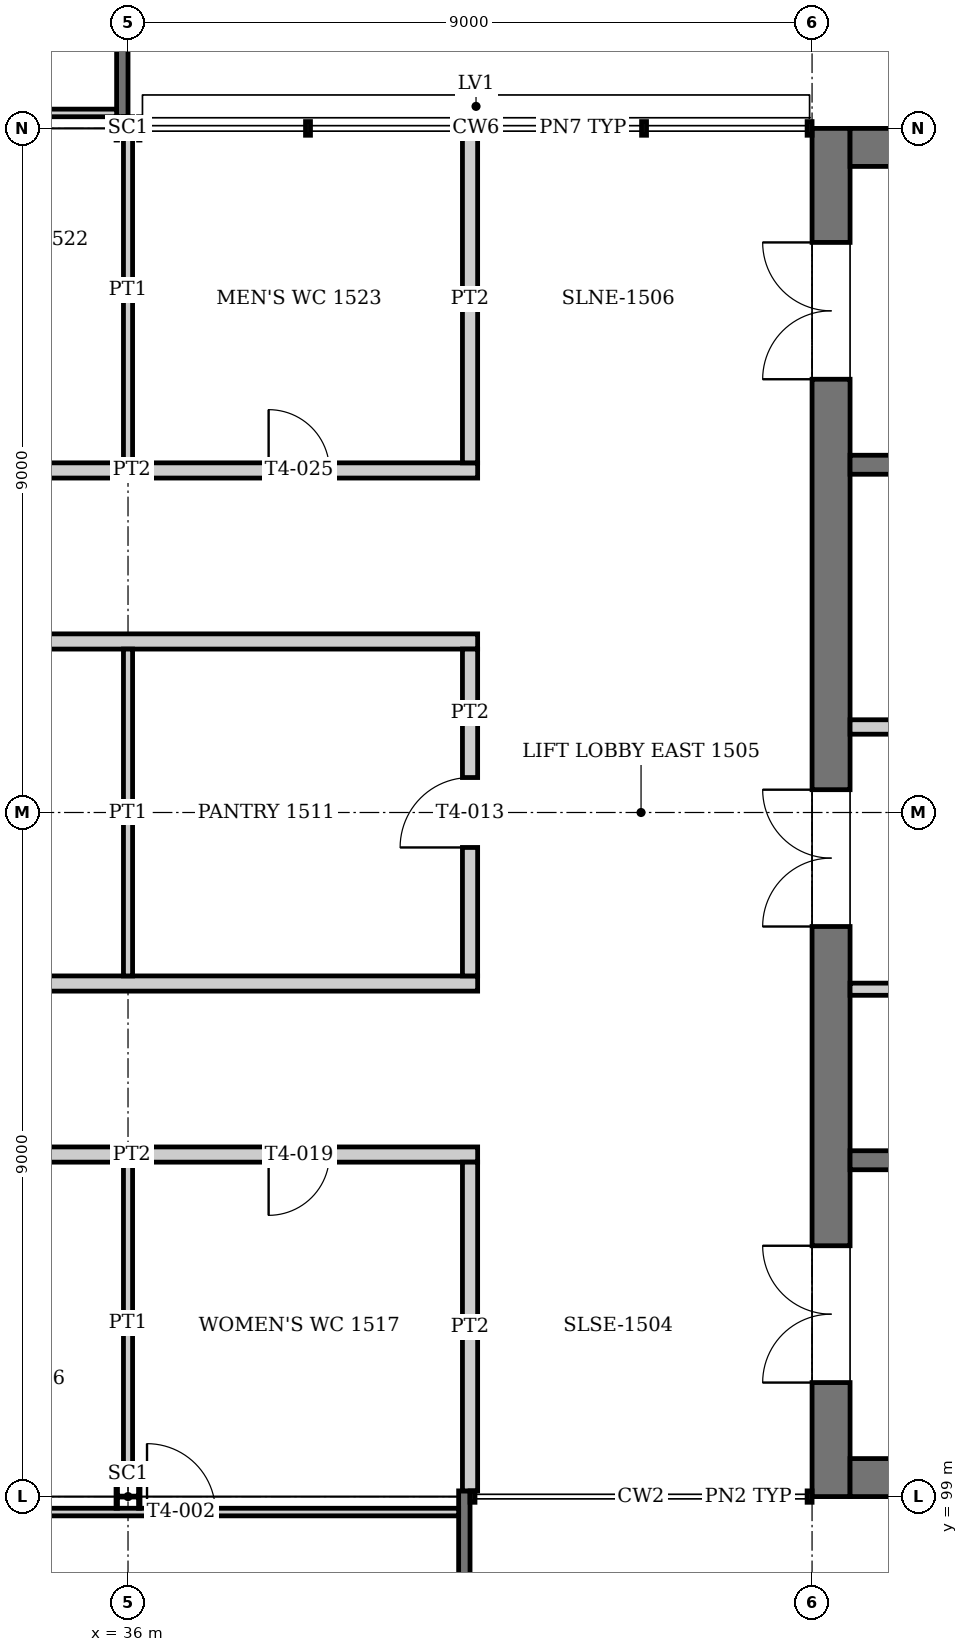
"""IFC4 building model, lengths in metres.
Left out: names, types, materials, properties, quantities, classifications, styles, units other than length and angle.
Written with IfcOpenShell. Run it as: python <this file> out.ifc"""

import sys

from ifc_helpers import new_model, si_unit, direction, frame, frame_2d, origin, origin_2d, place, context, subcontext, project, spatial, rectangle, i_section, extrude, element, fill, save


model = new_model("IFC4")
c1 = context("Model", 3, precision=1e-05, world=origin(), true_north=direction((0.0, 1.0)))
c2 = subcontext(c1, "Body", "Model", "MODEL_VIEW")
j1 = project(units=[si_unit("LENGTHUNIT", "METRE"), si_unit("PLANEANGLEUNIT", "RADIAN")], contexts=[c1])
p1 = place(None, origin())
s1 = spatial("IfcSite", under=j1, at=p1, CompositionType="ELEMENT")
p2 = place(p1, origin())
s2 = spatial("IfcBuilding", under=s1, at=p2, CompositionType="ELEMENT")
p3 = place(p2, frame((0.0, 0.0, 63.2)))
s3 = spatial("IfcBuildingStorey", under=s2, at=p3, CompositionType="ELEMENT", Elevation=63.2)
for number, where, z_axis, x_axis in (
    (1, (36.0, 99.0, 0.0), (0.0, 0.0, 1.0), (0.0, 1.0, 0.0)),
    (2, (36.0, 117.0, 0.0), (0.0, 0.0, 1.0), (0.0, 1.0, 0.0)),
):
    element("IfcColumn", number, at=place(p3, frame(where, z_axis=z_axis, x_axis=x_axis)), inside=s3, PredefinedType="COLUMN", context=c2, shape_type="SweptSolid", body=[
        extrude(i_section(OverallWidth=0.307, OverallDepth=0.315, WebThickness=0.012, FlangeThickness=0.019, at=origin_2d()), origin(), (0.0, 0.0, 1.0), 4.0),
    ])
p4 = place(p3, frame((45.25, 99.0, 0.0), z_axis=(0.0, 0.0, 1.0), x_axis=(0.0, 1.0, 0.0)))
e3 = element("IfcWall", 3, at=p4, inside=s3, PredefinedType="SHEAR", context=c2, shape_type="SweptSolid", body=[
    extrude(rectangle(XDim=18.0, YDim=0.5, at=frame_2d((9.0, 0.0))), origin(), (0.0, 0.0, 1.0), 4.0),
])
p5 = place(p4, frame((1.5, 0.0, 0.0)))
e4 = element("IfcOpeningElement", 4, at=p5, cuts=e3, PredefinedType="OPENING", context=c2, shape_type="SweptSolid", body=[
    extrude(rectangle(XDim=1.8, YDim=2.1, at=frame_2d((0.9, 1.05))), frame((0.0, 0.26, 0.0), z_axis=(0.0, -1.0, 0.0), x_axis=(1.0, 0.0, 0.0)), (0.0, 0.0, 1.0), 0.52),
])
p6 = place(p4, frame((14.7, 0.0, 0.0)))
e5 = element("IfcOpeningElement", 5, at=p6, cuts=e3, PredefinedType="OPENING", context=c2, shape_type="SweptSolid", body=[
    extrude(rectangle(XDim=1.8, YDim=2.1, at=frame_2d((0.9, 1.05))), frame((0.0, 0.26, 0.0), z_axis=(0.0, -1.0, 0.0), x_axis=(1.0, 0.0, 0.0)), (0.0, 0.0, 1.0), 0.52),
])
p7 = place(p4, frame((7.5, 0.0, 0.0)))
e6 = element("IfcOpeningElement", 6, at=p7, cuts=e3, PredefinedType="OPENING", context=c2, shape_type="SweptSolid", body=[
    extrude(rectangle(XDim=1.8, YDim=2.1, at=frame_2d((0.9, 1.05))), frame((0.0, 0.26, 0.0), z_axis=(0.0, -1.0, 0.0), x_axis=(1.0, 0.0, 0.0)), (0.0, 0.0, 1.0), 0.52),
])
for number, where, z_axis, x_axis in (
    (7, (45.5, 99.25, 0.0), (0.0, 0.0, 1.0), (1.0, 0.0, 0.0)),
    (8, (45.5, 116.75, 0.0), (0.0, 0.0, 1.0), (1.0, 0.0, 0.0)),
):
    element("IfcWall", number, at=place(p3, frame(where, z_axis=z_axis, x_axis=x_axis)), inside=s3, PredefinedType="SHEAR", context=c2, shape_type="SweptSolid", body=[
        extrude(rectangle(XDim=8.0, YDim=0.5, at=frame_2d((4.0, 0.0))), origin(), (0.0, 0.0, 1.0), 4.0),
    ])
p8 = place(p3, frame((40.425, 95.55, -0.15), z_axis=(0.0, 0.0, 1.0), x_axis=(0.0, 1.0, 0.0)))
e9 = element("IfcWall", 9, at=p8, inside=s3, PredefinedType="SOLIDWALL", context=c2, shape_type="SweptSolid", body=[
    extrude(rectangle(XDim=3.525, YDim=0.15, at=frame_2d((1.762, 0.0))), origin(), (0.0, 0.0, 1.0), 2.75),
])
p9 = place(p3, frame((31.65, 98.796, 0.0), z_axis=(0.0, 0.0, 1.0), x_axis=(1.0, 0.0, 0.0)))
e10 = element("IfcWall", 10, at=p9, inside=s3, PredefinedType="PARTITIONING", context=c2, shape_type="SweptSolid", body=[
    extrude(rectangle(XDim=8.7, YDim=0.1, at=frame_2d((4.35, 0.0))), origin(), (0.0, 0.0, 1.0), 2.6),
])
p10 = place(p9, frame((4.6, 0.0, 0.0)))
e11 = element("IfcOpeningElement", 11, at=p10, cuts=e10, PredefinedType="OPENING", context=c2, shape_type="SweptSolid", body=[
    extrude(rectangle(XDim=0.9, YDim=2.1, at=frame_2d((0.45, 1.05))), frame((0.0, 0.06, 0.0), z_axis=(0.0, -1.0, 0.0), x_axis=(1.0, 0.0, 0.0)), (0.0, 0.0, 1.0), 0.12),
])
p11 = place(p3, frame((35.925, 120.45, -0.15), z_axis=(0.0, 0.0, 1.0), x_axis=(0.0, -1.0, 0.0)))
e12 = element("IfcWall", 12, at=p11, inside=s3, PredefinedType="SOLIDWALL", context=c2, shape_type="SweptSolid", body=[
    extrude(rectangle(XDim=3.296, YDim=0.15, at=frame_2d((1.648, 0.0))), origin(), (0.0, 0.0, 1.0), 2.75),
])
p12 = place(p3, frame((18.15, 117.204, 0.0), z_axis=(0.0, 0.0, 1.0), x_axis=(1.0, 0.0, 0.0)))
e13 = element("IfcWall", 13, at=p12, inside=s3, PredefinedType="PARTITIONING", context=c2, shape_type="SweptSolid", body=[
    extrude(rectangle(XDim=17.7, YDim=0.1, at=frame_2d((8.85, 0.0))), origin(), (0.0, 0.0, 1.0), 2.6),
])
p13 = place(p12, frame((9.1, 0.0, 0.0)))
e14 = element("IfcOpeningElement", 14, at=p13, cuts=e13, PredefinedType="OPENING", context=c2, shape_type="SweptSolid", body=[
    extrude(rectangle(XDim=0.9, YDim=2.1, at=frame_2d((0.45, 1.05))), frame((0.0, 0.06, 0.0), z_axis=(0.0, -1.0, 0.0), x_axis=(1.0, 0.0, 0.0)), (0.0, 0.0, 1.0), 0.12),
])
for number, where, z_axis, x_axis in (
    (15, (45.5, 103.425, 0.0), (0.0, 0.0, 1.0), (1.0, 0.0, 0.0)),
    (16, (45.5, 112.575, 0.0), (0.0, 0.0, 1.0), (1.0, 0.0, 0.0)),
):
    element("IfcWall", number, at=place(p3, frame(where, z_axis=z_axis, x_axis=x_axis)), inside=s3, PredefinedType="SOLIDWALL", context=c2, shape_type="SweptSolid", body=[
        extrude(rectangle(XDim=8.0, YDim=0.25, at=frame_2d((4.0, 0.0))), origin(), (0.0, 0.0, 1.0), 3.75),
    ])
p14 = place(p3, frame((45.5, 105.675, 0.0), z_axis=(0.0, 0.0, 1.0), x_axis=(1.0, 0.0, 0.0)))
e17 = element("IfcWall", 17, at=p14, inside=s3, PredefinedType="PARTITIONING", context=c2, shape_type="SweptSolid", body=[
    extrude(rectangle(XDim=2.6, YDim=0.16, at=frame_2d((1.3, 0.0))), origin(), (0.0, 0.0, 1.0), 3.75),
])
p15 = place(p14, frame((0.7, 0.0, 0.0)))
e18 = element("IfcOpeningElement", 18, at=p15, cuts=e17, PredefinedType="OPENING", context=c2, shape_type="SweptSolid", body=[
    extrude(rectangle(XDim=1.2, YDim=2.1, at=frame_2d((0.6, 1.05))), frame((0.0, 0.09, 0.0), z_axis=(0.0, -1.0, 0.0), x_axis=(1.0, 0.0, 0.0)), (0.0, 0.0, 1.0), 0.18),
])
p16 = place(p3, frame((45.5, 109.125, 0.0), z_axis=(0.0, 0.0, 1.0), x_axis=(1.0, 0.0, 0.0)))
e19 = element("IfcWall", 19, at=p16, inside=s3, PredefinedType="PARTITIONING", context=c2, shape_type="SweptSolid", body=[
    extrude(rectangle(XDim=2.6, YDim=0.19, at=frame_2d((1.3, 0.0))), origin(), (0.0, 0.0, 1.0), 3.75),
])
p17 = place(p16, frame((0.84, 0.0, 0.0)))
e20 = element("IfcOpeningElement", 20, at=p17, cuts=e19, PredefinedType="OPENING", context=c2, shape_type="SweptSolid", body=[
    extrude(rectangle(XDim=0.92, YDim=2.1, at=frame_2d((0.46, 1.05))), frame((0.0, 0.105, 0.0), z_axis=(0.0, -1.0, 0.0), x_axis=(1.0, 0.0, 0.0)), (0.0, 0.0, 1.0), 0.21),
])
p18 = place(p3, frame((13.4, 103.5, 0.0), z_axis=(0.0, 0.0, 1.0), x_axis=(1.0, 0.0, 0.0)))
e21 = element("IfcWall", 21, at=p18, inside=s3, PredefinedType="PARTITIONING", context=c2, shape_type="SweptSolid", body=[
    extrude(rectangle(XDim=27.2, YDim=0.2, at=frame_2d((13.6, 0.0))), origin(), (0.0, 0.0, 1.0), 3.05),
])
p19 = place(p18, frame((1.85, 0.0, 0.0)))
e22 = element("IfcOpeningElement", 22, at=p19, cuts=e21, PredefinedType="OPENING", context=c2, shape_type="SweptSolid", body=[
    extrude(rectangle(XDim=1.0, YDim=2.1, at=frame_2d((0.5, 1.05))), frame((0.0, 0.11, 0.0), z_axis=(0.0, -1.0, 0.0), x_axis=(1.0, 0.0, 0.0)), (0.0, 0.0, 1.0), 0.22),
])
p20 = place(p18, frame((6.35, 0.0, 0.0)))
e23 = element("IfcOpeningElement", 23, at=p20, cuts=e21, PredefinedType="OPENING", context=c2, shape_type="SweptSolid", body=[
    extrude(rectangle(XDim=1.0, YDim=2.1, at=frame_2d((0.5, 1.05))), frame((0.0, 0.11, 0.0), z_axis=(0.0, -1.0, 0.0), x_axis=(1.0, 0.0, 0.0)), (0.0, 0.0, 1.0), 0.22),
])
p21 = place(p18, frame((10.85, 0.0, 0.0)))
e24 = element("IfcOpeningElement", 24, at=p21, cuts=e21, PredefinedType="OPENING", context=c2, shape_type="SweptSolid", body=[
    extrude(rectangle(XDim=1.0, YDim=2.1, at=frame_2d((0.5, 1.05))), frame((0.0, 0.11, 0.0), z_axis=(0.0, -1.0, 0.0), x_axis=(1.0, 0.0, 0.0)), (0.0, 0.0, 1.0), 0.22),
])
p22 = place(p18, frame((15.35, 0.0, 0.0)))
e25 = element("IfcOpeningElement", 25, at=p22, cuts=e21, PredefinedType="OPENING", context=c2, shape_type="SweptSolid", body=[
    extrude(rectangle(XDim=1.0, YDim=2.1, at=frame_2d((0.5, 1.05))), frame((0.0, 0.11, 0.0), z_axis=(0.0, -1.0, 0.0), x_axis=(1.0, 0.0, 0.0)), (0.0, 0.0, 1.0), 0.22),
])
p23 = place(p18, frame((19.85, 0.0, 0.0)))
e26 = element("IfcOpeningElement", 26, at=p23, cuts=e21, PredefinedType="OPENING", context=c2, shape_type="SweptSolid", body=[
    extrude(rectangle(XDim=1.0, YDim=2.1, at=frame_2d((0.5, 1.05))), frame((0.0, 0.11, 0.0), z_axis=(0.0, -1.0, 0.0), x_axis=(1.0, 0.0, 0.0)), (0.0, 0.0, 1.0), 0.22),
])
p24 = place(p18, frame((24.45, 0.0, 0.0)))
e27 = element("IfcOpeningElement", 27, at=p24, cuts=e21, PredefinedType="OPENING", context=c2, shape_type="SweptSolid", body=[
    extrude(rectangle(XDim=0.8, YDim=2.1, at=frame_2d((0.4, 1.05))), frame((0.0, 0.11, 0.0), z_axis=(0.0, -1.0, 0.0), x_axis=(1.0, 0.0, 0.0)), (0.0, 0.0, 1.0), 0.22),
])
p25 = place(p3, frame((13.4, 105.75, 0.0), z_axis=(0.0, 0.0, 1.0), x_axis=(1.0, 0.0, 0.0)))
e28 = element("IfcWall", 28, at=p25, inside=s3, PredefinedType="PARTITIONING", context=c2, shape_type="SweptSolid", body=[
    extrude(rectangle(XDim=27.2, YDim=0.2, at=frame_2d((13.6, 0.0))), origin(), (0.0, 0.0, 1.0), 3.05),
])
p26 = place(p25, frame((12.9, 0.0, 0.0)))
e29 = element("IfcOpeningElement", 29, at=p26, cuts=e28, PredefinedType="OPENING", context=c2, shape_type="SweptSolid", body=[
    extrude(rectangle(XDim=1.4, YDim=2.1, at=frame_2d((0.7, 1.05))), frame((0.0, 0.11, 0.0), z_axis=(0.0, -1.0, 0.0), x_axis=(1.0, 0.0, 0.0)), (0.0, 0.0, 1.0), 0.22),
])
p27 = place(p3, frame((13.4, 110.25, 0.0), z_axis=(0.0, 0.0, 1.0), x_axis=(1.0, 0.0, 0.0)))
e30 = element("IfcWall", 30, at=p27, inside=s3, PredefinedType="PARTITIONING", context=c2, shape_type="SweptSolid", body=[
    extrude(rectangle(XDim=27.2, YDim=0.2, at=frame_2d((13.6, 0.0))), origin(), (0.0, 0.0, 1.0), 3.05),
])
p28 = place(p27, frame((12.9, 0.0, 0.0)))
e31 = element("IfcOpeningElement", 31, at=p28, cuts=e30, PredefinedType="OPENING", context=c2, shape_type="SweptSolid", body=[
    extrude(rectangle(XDim=1.4, YDim=2.1, at=frame_2d((0.7, 1.05))), frame((0.0, 0.11, 0.0), z_axis=(0.0, -1.0, 0.0), x_axis=(1.0, 0.0, 0.0)), (0.0, 0.0, 1.0), 0.22),
])
p29 = place(p3, frame((18.08, 112.5, 0.0), z_axis=(0.0, 0.0, 1.0), x_axis=(1.0, 0.0, 0.0)))
e32 = element("IfcWall", 32, at=p29, inside=s3, PredefinedType="PARTITIONING", context=c2, shape_type="SweptSolid", body=[
    extrude(rectangle(XDim=22.52, YDim=0.2, at=frame_2d((11.26, 0.0))), origin(), (0.0, 0.0, 1.0), 3.05),
])
p30 = place(p29, frame((1.67, 0.0, 0.0)))
e33 = element("IfcOpeningElement", 33, at=p30, cuts=e32, PredefinedType="OPENING", context=c2, shape_type="SweptSolid", body=[
    extrude(rectangle(XDim=1.0, YDim=2.1, at=frame_2d((0.5, 1.05))), frame((0.0, 0.11, 0.0), z_axis=(0.0, -1.0, 0.0), x_axis=(1.0, 0.0, 0.0)), (0.0, 0.0, 1.0), 0.22),
])
p31 = place(p29, frame((6.17, 0.0, 0.0)))
e34 = element("IfcOpeningElement", 34, at=p31, cuts=e32, PredefinedType="OPENING", context=c2, shape_type="SweptSolid", body=[
    extrude(rectangle(XDim=1.0, YDim=2.1, at=frame_2d((0.5, 1.05))), frame((0.0, 0.11, 0.0), z_axis=(0.0, -1.0, 0.0), x_axis=(1.0, 0.0, 0.0)), (0.0, 0.0, 1.0), 0.22),
])
p32 = place(p29, frame((10.67, 0.0, 0.0)))
e35 = element("IfcOpeningElement", 35, at=p32, cuts=e32, PredefinedType="OPENING", context=c2, shape_type="SweptSolid", body=[
    extrude(rectangle(XDim=1.0, YDim=2.1, at=frame_2d((0.5, 1.05))), frame((0.0, 0.11, 0.0), z_axis=(0.0, -1.0, 0.0), x_axis=(1.0, 0.0, 0.0)), (0.0, 0.0, 1.0), 0.22),
])
p33 = place(p29, frame((15.17, 0.0, 0.0)))
e36 = element("IfcOpeningElement", 36, at=p33, cuts=e32, PredefinedType="OPENING", context=c2, shape_type="SweptSolid", body=[
    extrude(rectangle(XDim=1.0, YDim=2.1, at=frame_2d((0.5, 1.05))), frame((0.0, 0.11, 0.0), z_axis=(0.0, -1.0, 0.0), x_axis=(1.0, 0.0, 0.0)), (0.0, 0.0, 1.0), 0.22),
])
p34 = place(p29, frame((19.77, 0.0, 0.0)))
e37 = element("IfcOpeningElement", 37, at=p34, cuts=e32, PredefinedType="OPENING", context=c2, shape_type="SweptSolid", body=[
    extrude(rectangle(XDim=0.8, YDim=2.1, at=frame_2d((0.4, 1.05))), frame((0.0, 0.11, 0.0), z_axis=(0.0, -1.0, 0.0), x_axis=(1.0, 0.0, 0.0)), (0.0, 0.0, 1.0), 0.22),
])
p35 = place(p3, frame((36.0, 99.157, 0.0), z_axis=(0.0, 0.0, 1.0), x_axis=(0.0, 1.0, 0.0)))
e38 = element("IfcWall", 38, at=p35, inside=s3, PredefinedType="PARTITIONING", context=c2, shape_type="SweptSolid", body=[
    extrude(rectangle(XDim=4.242, YDim=0.12, at=frame_2d((2.121, 0.0))), origin(), (0.0, 0.0, 1.0), 3.05),
])
p36 = place(p3, frame((36.0, 105.85, 0.0), z_axis=(0.0, 0.0, 1.0), x_axis=(0.0, 1.0, 0.0)))
e39 = element("IfcWall", 39, at=p36, inside=s3, PredefinedType="PARTITIONING", context=c2, shape_type="SweptSolid", body=[
    extrude(rectangle(XDim=4.3, YDim=0.12, at=frame_2d((2.15, 0.0))), origin(), (0.0, 0.0, 1.0), 3.05),
])
p37 = place(p3, frame((36.0, 112.6, 0.0), z_axis=(0.0, 0.0, 1.0), x_axis=(0.0, 1.0, 0.0)))
e40 = element("IfcWall", 40, at=p37, inside=s3, PredefinedType="PARTITIONING", context=c2, shape_type="SweptSolid", body=[
    extrude(rectangle(XDim=4.553, YDim=0.12, at=frame_2d((2.277, 0.0))), origin(), (0.0, 0.0, 1.0), 3.05),
])
p38 = place(p3, frame((40.5, 99.075, 0.0), z_axis=(0.0, 0.0, 1.0), x_axis=(0.0, 1.0, 0.0)))
e41 = element("IfcWall", 41, at=p38, inside=s3, PredefinedType="PARTITIONING", context=c2, shape_type="SweptSolid", body=[
    extrude(rectangle(XDim=4.325, YDim=0.2, at=frame_2d((2.163, 0.0))), origin(), (0.0, 0.0, 1.0), 3.05),
])
p39 = place(p3, frame((40.5, 105.85, 0.0), z_axis=(0.0, 0.0, 1.0), x_axis=(0.0, 1.0, 0.0)))
e42 = element("IfcWall", 42, at=p39, inside=s3, PredefinedType="PARTITIONING", context=c2, shape_type="SweptSolid", body=[
    extrude(rectangle(XDim=4.3, YDim=0.2, at=frame_2d((2.15, 0.0))), origin(), (0.0, 0.0, 1.0), 3.05),
])
p40 = place(p39, frame((1.69, 0.0, 0.0)))
e43 = element("IfcOpeningElement", 43, at=p40, cuts=e42, PredefinedType="OPENING", context=c2, shape_type="SweptSolid", body=[
    extrude(rectangle(XDim=0.92, YDim=2.1, at=frame_2d((0.46, 1.05))), frame((0.0, 0.11, 0.0), z_axis=(0.0, -1.0, 0.0), x_axis=(1.0, 0.0, 0.0)), (0.0, 0.0, 1.0), 0.22),
])
p41 = place(p3, frame((40.5, 112.6, 0.0), z_axis=(0.0, 0.0, 1.0), x_axis=(0.0, 1.0, 0.0)))
e44 = element("IfcWall", 44, at=p41, inside=s3, PredefinedType="PARTITIONING", context=c2, shape_type="SweptSolid", body=[
    extrude(rectangle(XDim=4.31, YDim=0.2, at=frame_2d((2.155, 0.0))), origin(), (0.0, 0.0, 1.0), 3.05),
])
p42 = place(p10, origin())
e45 = element("IfcDoor", 45, at=p42, inside=s3, OperationType="SINGLE_SWING_LEFT", PredefinedType="DOOR", context=c2, shape_type="SweptSolid", body=[
    extrude(rectangle(XDim=0.9, YDim=2.1, at=frame_2d((0.45, 1.05))), frame((0.0, 0.025, 0.0), z_axis=(0.0, -1.0, 0.0), x_axis=(1.0, 0.0, 0.0)), (0.0, 0.0, 1.0), 0.05),
])
fill(e11, e45)
p43 = place(p40, origin())
e46 = element("IfcDoor", 46, at=p43, inside=s3, OperationType="SINGLE_SWING_LEFT", PredefinedType="DOOR", context=c2, shape_type="SweptSolid", body=[
    extrude(rectangle(XDim=0.92, YDim=2.1, at=frame_2d((0.46, 1.05))), frame((0.0, 0.025, 0.0), z_axis=(0.0, -1.0, 0.0), x_axis=(1.0, 0.0, 0.0)), (0.0, 0.0, 1.0), 0.05),
])
fill(e43, e46)
p44 = place(p24, frame((0.8, 0.0, 0.0), z_axis=(0.0, 0.0, 1.0), x_axis=(-1.0, 0.0, 0.0)))
e47 = element("IfcDoor", 47, at=p44, inside=s3, OperationType="SINGLE_SWING_RIGHT", PredefinedType="DOOR", context=c2, shape_type="SweptSolid", body=[
    extrude(rectangle(XDim=0.8, YDim=2.1, at=frame_2d((0.4, 1.05))), frame((0.0, 0.025, 0.0), z_axis=(0.0, -1.0, 0.0), x_axis=(1.0, 0.0, 0.0)), (0.0, 0.0, 1.0), 0.05),
])
fill(e27, e47)
p45 = place(p34, origin())
e48 = element("IfcDoor", 48, at=p45, inside=s3, OperationType="SINGLE_SWING_LEFT", PredefinedType="DOOR", context=c2, shape_type="SweptSolid", body=[
    extrude(rectangle(XDim=0.8, YDim=2.1, at=frame_2d((0.4, 1.05))), frame((0.0, 0.025, 0.0), z_axis=(0.0, -1.0, 0.0), x_axis=(1.0, 0.0, 0.0)), (0.0, 0.0, 1.0), 0.05),
])
fill(e37, e48)
p46 = place(p5, origin())
e49 = element("IfcDoor", 49, at=p46, inside=s3, OperationType="DOUBLE_DOOR_SINGLE_SWING", PredefinedType="DOOR", context=c2, shape_type="SweptSolid", body=[
    extrude(rectangle(XDim=1.8, YDim=2.1, at=frame_2d((0.9, 1.05))), frame((0.0, 0.025, 0.0), z_axis=(0.0, -1.0, 0.0), x_axis=(1.0, 0.0, 0.0)), (0.0, 0.0, 1.0), 0.05),
])
fill(e4, e49)
p47 = place(p6, origin())
e50 = element("IfcDoor", 50, at=p47, inside=s3, OperationType="DOUBLE_DOOR_SINGLE_SWING", PredefinedType="DOOR", context=c2, shape_type="SweptSolid", body=[
    extrude(rectangle(XDim=1.8, YDim=2.1, at=frame_2d((0.9, 1.05))), frame((0.0, 0.025, 0.0), z_axis=(0.0, -1.0, 0.0), x_axis=(1.0, 0.0, 0.0)), (0.0, 0.0, 1.0), 0.05),
])
fill(e5, e50)
p48 = place(p7, origin())
e51 = element("IfcDoor", 51, at=p48, inside=s3, OperationType="DOUBLE_DOOR_SINGLE_SWING", PredefinedType="DOOR", context=c2, shape_type="SweptSolid", body=[
    extrude(rectangle(XDim=1.8, YDim=2.1, at=frame_2d((0.9, 1.05))), frame((0.0, 0.025, 0.0), z_axis=(0.0, -1.0, 0.0), x_axis=(1.0, 0.0, 0.0)), (0.0, 0.0, 1.0), 0.05),
])
fill(e6, e51)
save(model, sys.argv[1])
